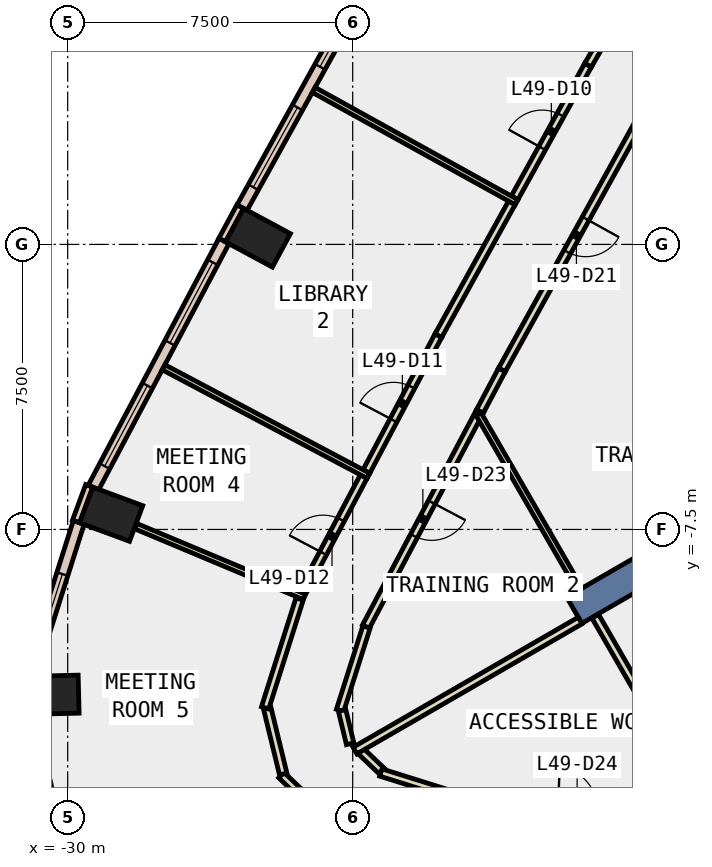
"""IFC4 building model, lengths in metres.
Left out: names, types, materials, properties, quantities, classifications, styles, units other than length and angle.
Written with IfcOpenShell. Run it as: python <this file> out.ifc"""

import sys

from ifc_helpers import new_model, si_unit, direction, frame, frame_2d, origin, origin_2d, place, context, subcontext, project, spatial, rectangle, extrude, element, fill, save


model = new_model("IFC4")
c1 = context("Model", 3, precision=1e-05, world=origin(), true_north=direction((0.0, 1.0)))
c2 = subcontext(c1, "Body", "Model", "MODEL_VIEW")
j1 = project(units=[si_unit("LENGTHUNIT", "METRE"), si_unit("PLANEANGLEUNIT", "RADIAN")], contexts=[c1])
p1 = place(None, origin())
s1 = spatial("IfcSite", under=j1, at=p1, CompositionType="ELEMENT")
p2 = place(p1, origin())
s2 = spatial("IfcBuilding", under=s1, at=p2, CompositionType="ELEMENT")
p3 = place(p2, frame((0.0, 0.0, 219.2)))
s3 = spatial("IfcBuildingStorey", under=s2, at=p3, CompositionType="ELEMENT", Elevation=219.2)
for number, where, z_axis, x_axis in (
    (1, (-24.993, 0.175, -0.4), (0.0, 0.0, 1.0), (0.474, 0.88, 0.0)),
    (2, (-28.856, -7.1, -0.4), (0.0, 0.0, 1.0), (0.347, 0.938, 0.0)),
    (3, (-30.412, -11.851, -0.4), (0.0, 0.0, 1.0), (-0.025, 1.0, 0.0)),
):
    element("IfcColumn", number, at=place(p3, frame(where, z_axis=z_axis, x_axis=x_axis)), inside=s3, PredefinedType="COLUMN", context=c2, shape_type="SweptSolid", body=[
        extrude(rectangle(XDim=1.0, YDim=1.4, at=origin_2d()), origin(), (0.0, 0.0, 1.0), 4.2),
    ])
p4 = place(p3, frame((-8.877, -5.125, -0.4), z_axis=(0.0, 0.0, 1.0), x_axis=(-0.866017533419, -0.500013631625, 0.0)))
e4 = element("IfcWall", 4, at=p4, inside=s3, PredefinedType="SHEAR", context=c2, shape_type="SweptSolid", body=[
    extrude(rectangle(XDim=9.0, YDim=0.8, at=frame_2d((4.5, 0.0))), origin(), (0.0, 0.0, 1.0), 4.2),
])
p5 = place(p3, frame((-25.46, 0.995, 0.0), z_axis=(0.0, 0.0, 1.0), x_axis=(-0.473852444207, -0.880604259085, 0.0)))
e5 = element("IfcWall", 5, at=p5, inside=s3, PredefinedType="STANDARD", context=c2, shape_type="SweptSolid", body=[
    extrude(rectangle(XDim=1.0, YDim=0.2, at=frame_2d((0.5, 0.0))), origin(), (0.0, 0.0, 1.0), 3.8),
])
p6 = place(p3, frame((-29.433, -6.354, 0.0), z_axis=(0.0, 0.0, 1.0), x_axis=(-0.346892928577, -0.937904737222, 0.0)))
e6 = element("IfcWall", 6, at=p6, inside=s3, PredefinedType="STANDARD", context=c2, shape_type="SweptSolid", body=[
    extrude(rectangle(XDim=1.0, YDim=0.2, at=frame_2d((0.5, 0.0))), origin(), (0.0, 0.0, 1.0), 3.8),
])
p7 = place(p3, frame((-21.902, 7.309, 0.0), z_axis=(0.0, 0.0, 1.0), x_axis=(-0.484163461668, -0.87497756679, 0.0)))
e7 = element("IfcWall", 7, at=p7, inside=s3, PredefinedType="STANDARD", context=c2, shape_type="SweptSolid", body=[
    extrude(rectangle(XDim=7.247, YDim=0.3, at=frame_2d((3.624, 0.0))), origin(), (0.0, 0.0, 1.0), 3.8),
])
p8 = place(p7, frame((0.612, 0.0, 0.9)))
e8 = element("IfcOpeningElement", 8, at=p8, cuts=e7, PredefinedType="OPENING", context=c2, shape_type="SweptSolid", body=[
    extrude(rectangle(XDim=2.4, YDim=2.6, at=frame_2d((1.2, 1.3))), frame((0.0, 0.16, 0.0), z_axis=(0.0, -1.0, 0.0), x_axis=(1.0, 0.0, 0.0)), (0.0, 0.0, 1.0), 0.32),
])
p9 = place(p7, frame((4.235, 0.0, 0.9)))
e9 = element("IfcOpeningElement", 9, at=p9, cuts=e7, PredefinedType="OPENING", context=c2, shape_type="SweptSolid", body=[
    extrude(rectangle(XDim=2.4, YDim=2.6, at=frame_2d((1.2, 1.3))), frame((0.0, 0.16, 0.0), z_axis=(0.0, -1.0, 0.0), x_axis=(1.0, 0.0, 0.0)), (0.0, 0.0, 1.0), 0.32),
])
p10 = place(p3, frame((-25.887, 0.09, 0.0), z_axis=(0.0, 0.0, 1.0), x_axis=(-0.468020680141, -0.8837175131, 0.0)))
e10 = element("IfcWall", 10, at=p10, inside=s3, PredefinedType="STANDARD", context=c2, shape_type="SweptSolid", body=[
    extrude(rectangle(XDim=7.34, YDim=0.3, at=frame_2d((3.67, 0.0))), origin(), (0.0, 0.0, 1.0), 3.8),
])
p11 = place(p10, frame((0.635, 0.0, 0.9)))
e11 = element("IfcOpeningElement", 11, at=p11, cuts=e10, PredefinedType="OPENING", context=c2, shape_type="SweptSolid", body=[
    extrude(rectangle(XDim=2.4, YDim=2.6, at=frame_2d((1.2, 1.3))), frame((0.0, 0.16, 0.0), z_axis=(0.0, -1.0, 0.0), x_axis=(1.0, 0.0, 0.0)), (0.0, 0.0, 1.0), 0.32),
])
p12 = place(p10, frame((4.305, 0.0, 0.9)))
e12 = element("IfcOpeningElement", 12, at=p12, cuts=e10, PredefinedType="OPENING", context=c2, shape_type="SweptSolid", body=[
    extrude(rectangle(XDim=2.4, YDim=2.6, at=frame_2d((1.2, 1.3))), frame((0.0, 0.16, 0.0), z_axis=(0.0, -1.0, 0.0), x_axis=(1.0, 0.0, 0.0)), (0.0, 0.0, 1.0), 0.32),
])
p13 = place(p3, frame((-29.71, -7.316, 0.0), z_axis=(0.0, 0.0, 1.0), x_axis=(-0.302195467572, -0.953245980521, 0.0)))
e13 = element("IfcWall", 13, at=p13, inside=s3, PredefinedType="STANDARD", context=c2, shape_type="SweptSolid", body=[
    extrude(rectangle(XDim=4.249, YDim=0.3, at=frame_2d((2.125, 0.0))), origin(), (0.0, 0.0, 1.0), 3.8),
])
p14 = place(p13, frame((1.424, 0.0, 0.9)))
e14 = element("IfcOpeningElement", 14, at=p14, cuts=e13, PredefinedType="OPENING", context=c2, shape_type="SweptSolid", body=[
    extrude(rectangle(XDim=1.4, YDim=2.6, at=frame_2d((0.7, 1.3))), frame((0.0, 0.16, 0.0), z_axis=(0.0, -1.0, 0.0), x_axis=(1.0, 0.0, 0.0)), (0.0, 0.0, 1.0), 0.32),
])
p15 = place(p3, frame((-31.038, -12.365, 0.0), z_axis=(0.0, 0.0, 1.0), x_axis=(0.235766276378, -0.971809787419, 0.0)))
e15 = element("IfcWall", 15, at=p15, inside=s3, PredefinedType="STANDARD", context=c2, shape_type="SweptSolid", body=[
    extrude(rectangle(XDim=4.077, YDim=0.3, at=frame_2d((2.039, 0.0))), origin(), (0.0, 0.0, 1.0), 3.8),
])
p16 = place(p15, frame((1.338, 0.0, 0.9)))
e16 = element("IfcOpeningElement", 16, at=p16, cuts=e15, PredefinedType="OPENING", context=c2, shape_type="SweptSolid", body=[
    extrude(rectangle(XDim=1.4, YDim=2.6, at=frame_2d((0.7, 1.3))), frame((0.0, 0.16, 0.0), z_axis=(0.0, -1.0, 0.0), x_axis=(1.0, 0.0, 0.0)), (0.0, 0.0, 1.0), 0.32),
])
p17 = place(p3, frame((-14.652, 3.783, 0.0), z_axis=(0.0, 0.0, 1.0), x_axis=(-0.484249955458, -0.874929700398, 0.0)))
e17 = element("IfcWall", 17, at=p17, inside=s3, PredefinedType="PARTITIONING", context=c2, shape_type="SweptSolid", body=[
    extrude(rectangle(XDim=8.099, YDim=0.2, at=frame_2d((4.049, 0.0))), origin(), (0.0, 0.0, 1.0), 3.8),
])
p18 = place(p17, frame((3.55, 0.0, 0.0)))
e18 = element("IfcOpeningElement", 18, at=p18, cuts=e17, PredefinedType="OPENING", context=c2, shape_type="SweptSolid", body=[
    extrude(rectangle(XDim=1.0, YDim=2.1, at=frame_2d((0.5, 1.05))), frame((0.0, 0.11, 0.0), z_axis=(0.0, -1.0, 0.0), x_axis=(1.0, 0.0, 0.0)), (0.0, 0.0, 1.0), 0.22),
])
p19 = place(p3, frame((-18.574, -3.303, 0.0), z_axis=(0.0, 0.0, 1.0), x_axis=(-0.468458328651, -0.883485593724, 0.0)))
e19 = element("IfcWall", 19, at=p19, inside=s3, PredefinedType="PARTITIONING", context=c2, shape_type="SweptSolid", body=[
    extrude(rectangle(XDim=1.238, YDim=0.2, at=frame_2d((0.619, 0.0))), origin(), (0.0, 0.0, 1.0), 3.8),
])
p20 = place(p3, frame((-19.154, -4.397, 0.0), z_axis=(0.0, 0.0, 1.0), x_axis=(-0.468118749105, -0.883665568378, 0.0)))
e20 = element("IfcWall", 20, at=p20, inside=s3, PredefinedType="PARTITIONING", context=c2, shape_type="SweptSolid", body=[
    extrude(rectangle(XDim=6.409, YDim=0.2, at=frame_2d((3.204, 0.0))), origin(), (0.0, 0.0, 1.0), 3.8),
])
p21 = place(p20, frame((2.704, 0.0, 0.0)))
e21 = element("IfcOpeningElement", 21, at=p21, cuts=e20, PredefinedType="OPENING", context=c2, shape_type="SweptSolid", body=[
    extrude(rectangle(XDim=1.0, YDim=2.1, at=frame_2d((0.5, 1.05))), frame((0.0, 0.11, 0.0), z_axis=(0.0, -1.0, 0.0), x_axis=(1.0, 0.0, 0.0)), (0.0, 0.0, 1.0), 0.22),
])
p22 = place(p3, frame((-22.137, -10.067, 0.0), z_axis=(0.0, 0.0, 1.0), x_axis=(-0.302262657712, -0.953224677478, 0.0)))
e22 = element("IfcWall", 22, at=p22, inside=s3, PredefinedType="PARTITIONING", context=c2, shape_type="SweptSolid", body=[
    extrude(rectangle(XDim=2.303, YDim=0.2, at=frame_2d((1.151, 0.0))), origin(), (0.0, 0.0, 1.0), 3.8),
])
p23 = place(p3, frame((-22.779, -12.264, 0.0), z_axis=(0.0, 0.0, 1.0), x_axis=(0.2356388299, -0.971840697771, 0.0)))
e23 = element("IfcWall", 23, at=p23, inside=s3, PredefinedType="PARTITIONING", context=c2, shape_type="SweptSolid", body=[
    extrude(rectangle(XDim=0.9, YDim=0.2, at=frame_2d((0.45, 0.0))), origin(), (0.0, 0.0, 1.0), 3.8),
])
p24 = place(p3, frame((-22.281, -13.337, 0.0), z_axis=(0.0, 0.0, 1.0), x_axis=(0.723443840005, -0.690383234413, 0.0)))
e24 = element("IfcWall", 24, at=p24, inside=s3, PredefinedType="PARTITIONING", context=c2, shape_type="SweptSolid", body=[
    extrude(rectangle(XDim=0.753, YDim=0.2, at=frame_2d((0.376, 0.0))), origin(), (0.0, 0.0, 1.0), 3.8),
])
p25 = place(p3, frame((-21.759, -13.896, 0.0), z_axis=(0.0, 0.0, 1.0), x_axis=(0.954254371194, -0.298995978328, 0.0)))
e25 = element("IfcWall", 25, at=p25, inside=s3, PredefinedType="PARTITIONING", context=c2, shape_type="SweptSolid", body=[
    extrude(rectangle(XDim=2.622, YDim=0.2, at=frame_2d((1.311, 0.0))), origin(), (0.0, 0.0, 1.0), 3.8),
])
p26 = place(p3, frame((-18.24, 1.225, 0.0), z_axis=(0.0, 0.0, 1.0), x_axis=(0.484411997038, 0.874839995156, 0.0)))
e26 = element("IfcWall", 26, at=p26, inside=s3, PredefinedType="PARTITIONING", context=c2, shape_type="SweptSolid", body=[
    extrude(rectangle(XDim=3.993, YDim=0.2, at=frame_2d((1.996, 0.0))), origin(), (0.0, 0.0, 1.0), 3.8),
])
p27 = place(p26, frame((1.496, 0.0, 0.0)))
e27 = element("IfcOpeningElement", 27, at=p27, cuts=e26, PredefinedType="OPENING", context=c2, shape_type="SweptSolid", body=[
    extrude(rectangle(XDim=1.0, YDim=2.1, at=frame_2d((0.5, 1.05))), frame((0.0, 0.11, 0.0), z_axis=(0.0, -1.0, 0.0), x_axis=(1.0, 0.0, 0.0)), (0.0, 0.0, 1.0), 0.22),
])
p28 = place(p3, frame((-16.306, 4.718, 0.0), z_axis=(0.0, 0.0, 1.0), x_axis=(0.499803646539, 0.866138738832, 0.0)))
e28 = element("IfcWall", 28, at=p28, inside=s3, PredefinedType="PARTITIONING", context=c2, shape_type="SweptSolid", body=[
    extrude(rectangle(XDim=3.991, YDim=0.2, at=frame_2d((1.996, 0.0))), origin(), (0.0, 0.0, 1.0), 3.8),
])
p29 = place(p3, frame((-22.14, -5.976, 0.0), z_axis=(0.0, 0.0, 1.0), x_axis=(0.467979143965, 0.883739509592, 0.0)))
e29 = element("IfcWall", 29, at=p29, inside=s3, PredefinedType="PARTITIONING", context=c2, shape_type="SweptSolid", body=[
    extrude(rectangle(XDim=4.049, YDim=0.2, at=frame_2d((2.024, 0.0))), origin(), (0.0, 0.0, 1.0), 3.8),
])
p30 = place(p29, frame((1.524, 0.0, 0.0)))
e30 = element("IfcOpeningElement", 30, at=p30, cuts=e29, PredefinedType="OPENING", context=c2, shape_type="SweptSolid", body=[
    extrude(rectangle(XDim=1.0, YDim=2.1, at=frame_2d((0.5, 1.05))), frame((0.0, 0.11, 0.0), z_axis=(0.0, -1.0, 0.0), x_axis=(1.0, 0.0, 0.0)), (0.0, 0.0, 1.0), 0.22),
])
p31 = place(p3, frame((-20.245, -2.398, 0.0), z_axis=(0.0, 0.0, 1.0), x_axis=(0.484328424129, 0.874886265511, 0.0)))
e31 = element("IfcWall", 31, at=p31, inside=s3, PredefinedType="PARTITIONING", context=c2, shape_type="SweptSolid", body=[
    extrude(rectangle(XDim=3.991, YDim=0.2, at=frame_2d((1.996, 0.0))), origin(), (0.0, 0.0, 1.0), 3.8),
])
p32 = place(p3, frame((-23.878, -9.256, 0.0), z_axis=(0.0, 0.0, 1.0), x_axis=(0.46795384568, 0.883752905689, 0.0)))
e32 = element("IfcWall", 32, at=p32, inside=s3, PredefinedType="PARTITIONING", context=c2, shape_type="SweptSolid", body=[
    extrude(rectangle(XDim=3.562, YDim=0.2, at=frame_2d((1.781, 0.0))), origin(), (0.0, 0.0, 1.0), 3.8),
])
p33 = place(p32, frame((1.281, 0.0, 0.0)))
e33 = element("IfcOpeningElement", 33, at=p33, cuts=e32, PredefinedType="OPENING", context=c2, shape_type="SweptSolid", body=[
    extrude(rectangle(XDim=1.0, YDim=2.1, at=frame_2d((0.5, 1.05))), frame((0.0, 0.11, 0.0), z_axis=(0.0, -1.0, 0.0), x_axis=(1.0, 0.0, 0.0)), (0.0, 0.0, 1.0), 0.22),
])
p34 = place(p3, frame((-22.726, -15.538, 0.0), z_axis=(0.0, 0.0, 1.0), x_axis=(-0.723967420116, 0.689834164571, 0.0)))
e34 = element("IfcWall", 34, at=p34, inside=s3, PredefinedType="PARTITIONING", context=c2, shape_type="SweptSolid", body=[
    extrude(rectangle(XDim=2.282, YDim=0.2, at=frame_2d((1.141, 0.0))), origin(), (0.0, 0.0, 1.0), 3.8),
])
p35 = place(p3, frame((-24.329, -13.935, 0.0), z_axis=(0.0, 0.0, 1.0), x_axis=(-0.235756216468, 0.971812227952, 0.0)))
e35 = element("IfcWall", 35, at=p35, inside=s3, PredefinedType="PARTITIONING", context=c2, shape_type="SweptSolid", body=[
    extrude(rectangle(XDim=1.79, YDim=0.2, at=frame_2d((0.895, 0.0))), origin(), (0.0, 0.0, 1.0), 3.8),
])
p36 = place(p3, frame((-24.805, -12.194, 0.0), z_axis=(0.0, 0.0, 1.0), x_axis=(0.302200639646, 0.953244340868, 0.0)))
e36 = element("IfcWall", 36, at=p36, inside=s3, PredefinedType="PARTITIONING", context=c2, shape_type="SweptSolid", body=[
    extrude(rectangle(XDim=3.004, YDim=0.2, at=frame_2d((1.502, 0.0))), origin(), (0.0, 0.0, 1.0), 3.8),
])
p37 = place(p3, frame((-16.525, -9.079, 0.0), z_axis=(0.0, 0.0, 1.0), x_axis=(-0.499943228252, 0.866058178487, 0.0)))
e37 = element("IfcWall", 37, at=p37, inside=s3, PredefinedType="PARTITIONING", context=c2, shape_type="SweptSolid", body=[
    extrude(rectangle(XDim=5.329, YDim=0.15, at=frame_2d((2.664, 0.0))), origin(), (0.0, 0.0, 1.0), 3.8),
])
p38 = place(p3, frame((-14.457, -12.66, 0.0), z_axis=(0.0, 0.0, 1.0), x_axis=(-0.49997268395, 0.866041174139, 0.0)))
e38 = element("IfcWall", 38, at=p38, inside=s3, PredefinedType="PARTITIONING", context=c2, shape_type="SweptSolid", body=[
    extrude(rectangle(XDim=3.322, YDim=0.2, at=frame_2d((1.661, 0.0))), origin(), (0.0, 0.0, 1.0), 3.8),
])
p39 = place(p3, frame((-16.514, -9.897, 0.0), z_axis=(0.0, 0.0, 1.0), x_axis=(-0.866041209536, -0.499972622635, 0.0)))
e39 = element("IfcWall", 39, at=p39, inside=s3, PredefinedType="PARTITIONING", context=c2, shape_type="SweptSolid", body=[
    extrude(rectangle(XDim=6.843, YDim=0.2, at=frame_2d((3.421, 0.0))), origin(), (0.0, 0.0, 1.0), 3.8),
])
p40 = place(p3, frame((-18.189, 1.111, 0.0), z_axis=(0.0, 0.0, 1.0), x_axis=(-0.874928335558, 0.484252421405, 0.0)))
e40 = element("IfcWall", 40, at=p40, inside=s3, PredefinedType="PARTITIONING", context=c2, shape_type="SweptSolid", body=[
    extrude(rectangle(XDim=6.1, YDim=0.15, at=frame_2d((3.05, 0.0))), origin(), (0.0, 0.0, 1.0), 3.8),
])
p41 = place(p3, frame((-22.087, -6.089, 0.0), z_axis=(0.0, 0.0, 1.0), x_axis=(-0.883611647524, 0.468220521079, 0.0)))
e41 = element("IfcWall", 41, at=p41, inside=s3, PredefinedType="PARTITIONING", context=c2, shape_type="SweptSolid", body=[
    extrude(rectangle(XDim=6.1, YDim=0.15, at=frame_2d((3.05, 0.0))), origin(), (0.0, 0.0, 1.0), 3.8),
])
p42 = place(p3, frame((-23.774, -9.273, 0.0), z_axis=(0.0, 0.0, 1.0), x_axis=(-0.922217762148, 0.386670918454, 0.0)))
e42 = element("IfcWall", 42, at=p42, inside=s3, PredefinedType="PARTITIONING", context=c2, shape_type="SweptSolid", body=[
    extrude(rectangle(XDim=4.805, YDim=0.15, at=frame_2d((2.402, 0.0))), origin(), (0.0, 0.0, 1.0), 3.8),
])
p43 = place(p8, origin())
e43 = element("IfcWindow", 43, at=p43, inside=s3, PartitioningType="SINGLE_PANEL", PredefinedType="WINDOW", context=c2, shape_type="SweptSolid", body=[
    extrude(rectangle(XDim=2.4, YDim=2.6, at=frame_2d((1.2, 1.3))), frame((0.0, 0.03, 0.0), z_axis=(0.0, -1.0, 0.0), x_axis=(1.0, 0.0, 0.0)), (0.0, 0.0, 1.0), 0.06),
])
fill(e8, e43)
p44 = place(p9, origin())
e44 = element("IfcWindow", 44, at=p44, inside=s3, PartitioningType="SINGLE_PANEL", PredefinedType="WINDOW", context=c2, shape_type="SweptSolid", body=[
    extrude(rectangle(XDim=2.4, YDim=2.6, at=frame_2d((1.2, 1.3))), frame((0.0, 0.03, 0.0), z_axis=(0.0, -1.0, 0.0), x_axis=(1.0, 0.0, 0.0)), (0.0, 0.0, 1.0), 0.06),
])
fill(e9, e44)
p45 = place(p11, origin())
e45 = element("IfcWindow", 45, at=p45, inside=s3, PartitioningType="SINGLE_PANEL", PredefinedType="WINDOW", context=c2, shape_type="SweptSolid", body=[
    extrude(rectangle(XDim=2.4, YDim=2.6, at=frame_2d((1.2, 1.3))), frame((0.0, 0.03, 0.0), z_axis=(0.0, -1.0, 0.0), x_axis=(1.0, 0.0, 0.0)), (0.0, 0.0, 1.0), 0.06),
])
fill(e11, e45)
p46 = place(p12, origin())
e46 = element("IfcWindow", 46, at=p46, inside=s3, PartitioningType="SINGLE_PANEL", PredefinedType="WINDOW", context=c2, shape_type="SweptSolid", body=[
    extrude(rectangle(XDim=2.4, YDim=2.6, at=frame_2d((1.2, 1.3))), frame((0.0, 0.03, 0.0), z_axis=(0.0, -1.0, 0.0), x_axis=(1.0, 0.0, 0.0)), (0.0, 0.0, 1.0), 0.06),
])
fill(e12, e46)
p47 = place(p14, origin())
e47 = element("IfcWindow", 47, at=p47, inside=s3, PartitioningType="SINGLE_PANEL", PredefinedType="WINDOW", context=c2, shape_type="SweptSolid", body=[
    extrude(rectangle(XDim=1.4, YDim=2.6, at=frame_2d((0.7, 1.3))), frame((0.0, 0.03, 0.0), z_axis=(0.0, -1.0, 0.0), x_axis=(1.0, 0.0, 0.0)), (0.0, 0.0, 1.0), 0.06),
])
fill(e14, e47)
p48 = place(p16, origin())
e48 = element("IfcWindow", 48, at=p48, inside=s3, PartitioningType="SINGLE_PANEL", PredefinedType="WINDOW", context=c2, shape_type="SweptSolid", body=[
    extrude(rectangle(XDim=1.4, YDim=2.6, at=frame_2d((0.7, 1.3))), frame((0.0, 0.03, 0.0), z_axis=(0.0, -1.0, 0.0), x_axis=(1.0, 0.0, 0.0)), (0.0, 0.0, 1.0), 0.06),
])
fill(e16, e48)
p49 = place(p27, origin())
e49 = element("IfcDoor", 49, at=p49, inside=s3, OperationType="SINGLE_SWING_LEFT", PredefinedType="DOOR", context=c2, shape_type="SweptSolid", body=[
    extrude(rectangle(XDim=1.0, YDim=2.1, at=frame_2d((0.5, 1.05))), frame((0.0, 0.025, 0.0), z_axis=(0.0, -1.0, 0.0), x_axis=(1.0, 0.0, 0.0)), (0.0, 0.0, 1.0), 0.05),
])
fill(e27, e49)
p50 = place(p30, origin())
e50 = element("IfcDoor", 50, at=p50, inside=s3, OperationType="SINGLE_SWING_LEFT", PredefinedType="DOOR", context=c2, shape_type="SweptSolid", body=[
    extrude(rectangle(XDim=1.0, YDim=2.1, at=frame_2d((0.5, 1.05))), frame((0.0, 0.025, 0.0), z_axis=(0.0, -1.0, 0.0), x_axis=(1.0, 0.0, 0.0)), (0.0, 0.0, 1.0), 0.05),
])
fill(e30, e50)
p51 = place(p33, origin())
e51 = element("IfcDoor", 51, at=p51, inside=s3, OperationType="SINGLE_SWING_LEFT", PredefinedType="DOOR", context=c2, shape_type="SweptSolid", body=[
    extrude(rectangle(XDim=1.0, YDim=2.1, at=frame_2d((0.5, 1.05))), frame((0.0, 0.025, 0.0), z_axis=(0.0, -1.0, 0.0), x_axis=(1.0, 0.0, 0.0)), (0.0, 0.0, 1.0), 0.05),
])
fill(e33, e51)
p52 = place(p18, origin())
e52 = element("IfcDoor", 52, at=p52, inside=s3, OperationType="SINGLE_SWING_LEFT", PredefinedType="DOOR", context=c2, shape_type="SweptSolid", body=[
    extrude(rectangle(XDim=1.0, YDim=2.1, at=frame_2d((0.5, 1.05))), frame((0.0, 0.025, 0.0), z_axis=(0.0, -1.0, 0.0), x_axis=(1.0, 0.0, 0.0)), (0.0, 0.0, 1.0), 0.05),
])
fill(e18, e52)
p53 = place(p21, origin())
e53 = element("IfcDoor", 53, at=p53, inside=s3, OperationType="SINGLE_SWING_LEFT", PredefinedType="DOOR", context=c2, shape_type="SweptSolid", body=[
    extrude(rectangle(XDim=1.0, YDim=2.1, at=frame_2d((0.5, 1.05))), frame((0.0, 0.025, 0.0), z_axis=(0.0, -1.0, 0.0), x_axis=(1.0, 0.0, 0.0)), (0.0, 0.0, 1.0), 0.05),
])
fill(e21, e53)
save(model, sys.argv[1])
